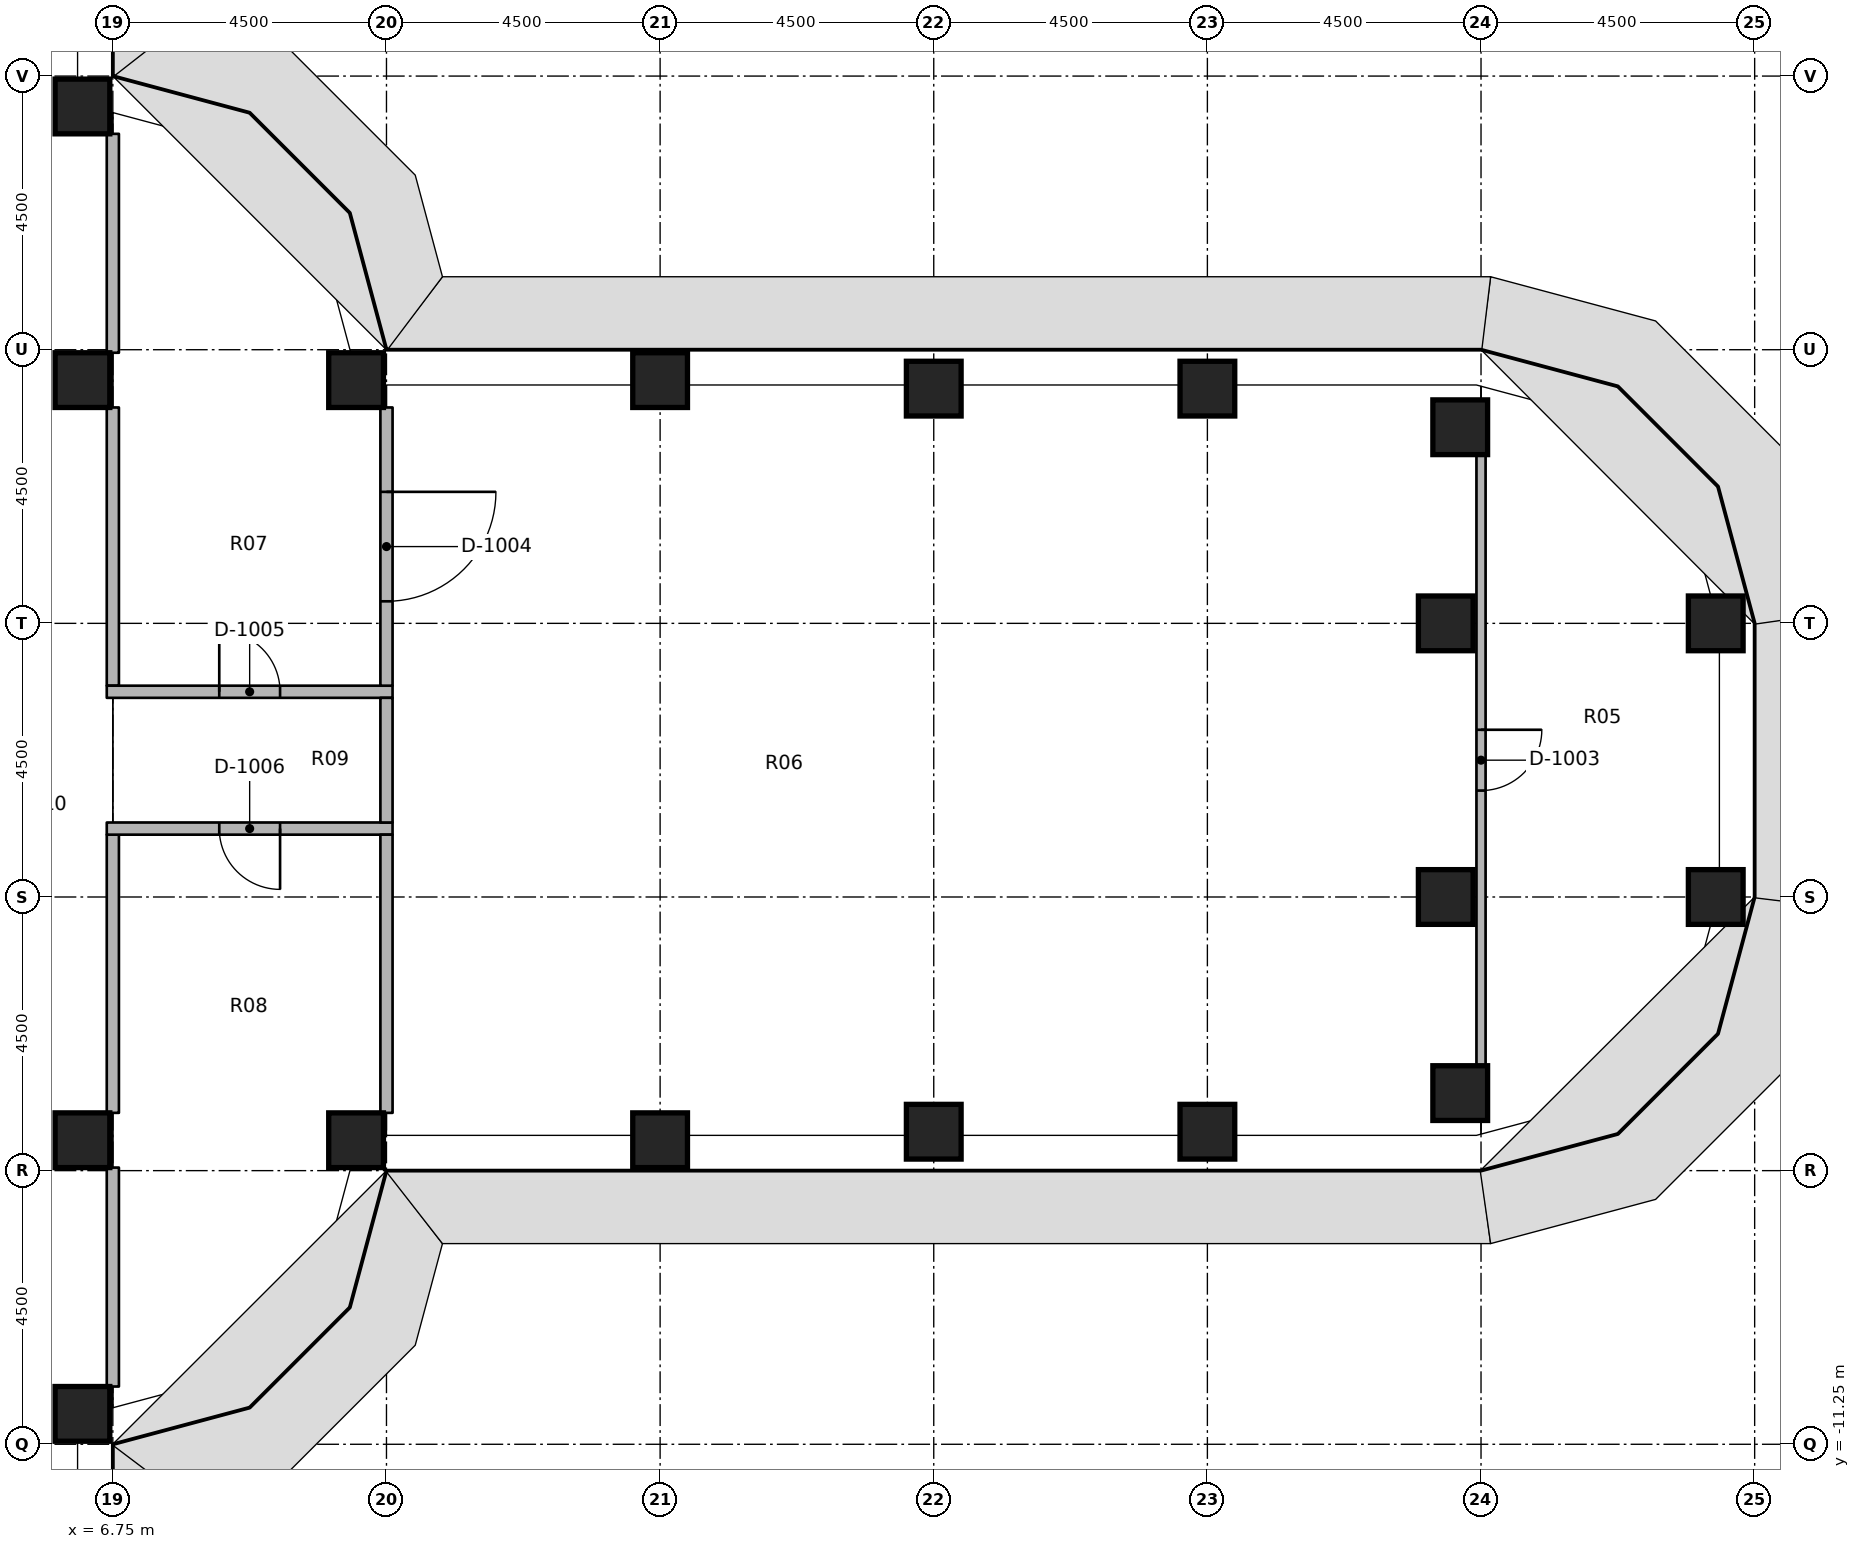
"""IFC4 building model, lengths in metres.
Left out: names, types, materials, properties, quantities, classifications, styles, units other than length and angle.
Written with IfcOpenShell. Run it as: python <this file> out.ifc"""

import sys

from ifc_helpers import new_model, si_unit, direction, frame, frame_2d, origin, origin_2d, place, context, subcontext, project, spatial, rectangle, extrude, element, fill, save


model = new_model("IFC4")
c1 = context("Model", 3, precision=1e-05, world=origin(), true_north=direction((0.0, 1.0)))
c2 = subcontext(c1, "Body", "Model", "MODEL_VIEW")
j1 = project(units=[si_unit("LENGTHUNIT", "METRE"), si_unit("PLANEANGLEUNIT", "RADIAN")], contexts=[c1])
p1 = place(None, origin())
s1 = spatial("IfcSite", under=j1, at=p1, CompositionType="ELEMENT")
p2 = place(p1, origin())
s2 = spatial("IfcBuilding", under=s1, at=p2, CompositionType="ELEMENT")
p3 = place(p2, frame((0.0, 0.0, 117.0)))
s3 = spatial("IfcBuildingStorey", under=s2, at=p3, CompositionType="ELEMENT", Elevation=117.0)
for number, where, z_axis, x_axis in (
    (1, (6.25, -10.75, 0.0), (0.0, 0.0, 1.0), (1.0, 0.0, 0.0)),
    (2, (6.25, -6.25, 0.0), (0.0, 0.0, 1.0), (1.0, 0.0, 0.0)),
    (3, (6.25, 6.25, 0.0), (0.0, 0.0, 1.0), (1.0, 0.0, 0.0)),
    (4, (6.25, 10.75, 0.0), (0.0, 0.0, 1.0), (1.0, 0.0, 0.0)),
    (5, (10.75, -6.25, 0.0), (0.0, 0.0, 1.0), (1.0, 0.0, 0.0)),
    (6, (10.75, 6.25, 0.0), (0.0, 0.0, 1.0), (1.0, 0.0, 0.0)),
    (7, (15.75, -6.25, 0.0), (0.0, 0.0, 1.0), (1.0, 0.0, 0.0)),
    (8, (15.75, 6.25, 0.0), (0.0, 0.0, 1.0), (1.0, 0.0, 0.0)),
    (9, (20.25, -6.11, 0.0), (0.0, 0.0, 1.0), (1.0, 0.0, 0.0)),
    (10, (20.25, 6.11, 0.0), (0.0, 0.0, 1.0), (1.0, 0.0, 0.0)),
    (11, (24.75, -6.11, 0.0), (0.0, 0.0, 1.0), (1.0, 0.0, 0.0)),
    (12, (24.75, 6.11, 0.0), (0.0, 0.0, 1.0), (1.0, 0.0, 0.0)),
    (13, (28.908, -5.475, 0.0), (0.0, 0.0, 1.0), (1.0, 0.0, 0.0)),
    (14, (28.67, -2.25, 0.0), (0.0, 0.0, 1.0), (1.0, 0.0, 0.0)),
    (15, (28.67, 2.25, 0.0), (0.0, 0.0, 1.0), (1.0, 0.0, 0.0)),
    (16, (28.908, 5.475, 0.0), (0.0, 0.0, 1.0), (1.0, 0.0, 0.0)),
    (17, (33.11, -2.25, 0.0), (0.0, 0.0, 1.0), (1.0, 0.0, 0.0)),
    (18, (33.11, 2.25, 0.0), (0.0, 0.0, 1.0), (1.0, 0.0, 0.0)),
):
    element("IfcColumn", number, at=place(p3, frame(where, z_axis=z_axis, x_axis=x_axis)), inside=s3, PredefinedType="COLUMN", context=c2, shape_type="SweptSolid", body=[
        extrude(rectangle(XDim=0.9, YDim=0.9, at=origin_2d()), origin(), (0.0, 0.0, 1.0), 3.65),
    ])
p4 = place(p3, frame((6.75, 1.225, 0.0), z_axis=(0.0, 0.0, 1.0), x_axis=(0.0, 1.0, 0.0)))
e19 = element("IfcWall", 19, at=p4, inside=s3, PredefinedType="PARTITIONING", context=c2, shape_type="SweptSolid", body=[
    extrude(rectangle(XDim=4.575, YDim=0.2, at=frame_2d((2.288, 0.0))), origin(), (0.0, 0.0, 1.0), 2.738),
])
for number, where, z_axis, x_axis in (
    (20, (6.75, 6.7, 0.0), (0.0, 0.0, 1.0), (0.0, 1.0, 0.0)),
    (21, (6.75, -10.3, 0.0), (0.0, 0.0, 1.0), (0.0, 1.0, 0.0)),
):
    element("IfcWall", number, at=place(p3, frame(where, z_axis=z_axis, x_axis=x_axis)), inside=s3, PredefinedType="PARTITIONING", context=c2, shape_type="SweptSolid", body=[
        extrude(rectangle(XDim=3.6, YDim=0.2, at=frame_2d((1.8, 0.0))), origin(), (0.0, 0.0, 1.0), 2.738),
    ])
p5 = place(p3, frame((6.75, -5.8, 0.0), z_axis=(0.0, 0.0, 1.0), x_axis=(0.0, 1.0, 0.0)))
e22 = element("IfcWall", 22, at=p5, inside=s3, PredefinedType="PARTITIONING", context=c2, shape_type="SweptSolid", body=[
    extrude(rectangle(XDim=4.575, YDim=0.2, at=frame_2d((2.288, 0.0))), origin(), (0.0, 0.0, 1.0), 2.738),
])
p6 = place(p3, frame((6.65, 1.125, 0.0), z_axis=(0.0, 0.0, 1.0), x_axis=(1.0, 0.0, 0.0)))
e23 = element("IfcWall", 23, at=p6, inside=s3, PredefinedType="PARTITIONING", context=c2, shape_type="SweptSolid", body=[
    extrude(rectangle(XDim=4.7, YDim=0.2, at=frame_2d((2.35, 0.0))), origin(), (0.0, 0.0, 1.0), 2.738),
])
p7 = place(p6, frame((1.85, 0.0, 0.0)))
e24 = element("IfcOpeningElement", 24, at=p7, cuts=e23, PredefinedType="OPENING", context=c2, shape_type="SweptSolid", body=[
    extrude(rectangle(XDim=1.0, YDim=2.1, at=frame_2d((0.5, 1.05))), frame((0.0, 0.11, 0.0), z_axis=(0.0, -1.0, 0.0), x_axis=(1.0, 0.0, 0.0)), (0.0, 0.0, 1.0), 0.22),
])
p8 = place(p3, frame((11.35, -1.125, 0.0), z_axis=(0.0, 0.0, 1.0), x_axis=(-1.0, 0.0, 0.0)))
e25 = element("IfcWall", 25, at=p8, inside=s3, PredefinedType="PARTITIONING", context=c2, shape_type="SweptSolid", body=[
    extrude(rectangle(XDim=4.7, YDim=0.2, at=frame_2d((2.35, 0.0))), origin(), (0.0, 0.0, 1.0), 2.738),
])
p9 = place(p8, frame((1.85, 0.0, 0.0)))
e26 = element("IfcOpeningElement", 26, at=p9, cuts=e25, PredefinedType="OPENING", context=c2, shape_type="SweptSolid", body=[
    extrude(rectangle(XDim=1.0, YDim=2.1, at=frame_2d((0.5, 1.05))), frame((0.0, 0.11, 0.0), z_axis=(0.0, -1.0, 0.0), x_axis=(1.0, 0.0, 0.0)), (0.0, 0.0, 1.0), 0.22),
])
p10 = place(p3, frame((11.25, -1.025, 0.0), z_axis=(0.0, 0.0, 1.0), x_axis=(0.0, 1.0, 0.0)))
e27 = element("IfcWall", 27, at=p10, inside=s3, PredefinedType="PARTITIONING", context=c2, shape_type="SweptSolid", body=[
    extrude(rectangle(XDim=2.05, YDim=0.2, at=frame_2d((1.025, 0.0))), origin(), (0.0, 0.0, 1.0), 2.738),
])
p11 = place(p3, frame((11.25, 5.8, 0.0), z_axis=(0.0, 0.0, 1.0), x_axis=(0.0, -1.0, 0.0)))
e28 = element("IfcWall", 28, at=p11, inside=s3, PredefinedType="PARTITIONING", context=c2, shape_type="SweptSolid", body=[
    extrude(rectangle(XDim=4.575, YDim=0.2, at=frame_2d((2.288, 0.0))), origin(), (0.0, 0.0, 1.0), 2.738),
])
p12 = place(p11, frame((1.387, 0.0, 0.0)))
e29 = element("IfcOpeningElement", 29, at=p12, cuts=e28, PredefinedType="OPENING", context=c2, shape_type="SweptSolid", body=[
    extrude(rectangle(XDim=1.8, YDim=2.1, at=frame_2d((0.9, 1.05))), frame((0.0, 0.11, 0.0), z_axis=(0.0, -1.0, 0.0), x_axis=(1.0, 0.0, 0.0)), (0.0, 0.0, 1.0), 0.22),
])
p13 = place(p3, frame((11.25, -5.8, 0.0), z_axis=(0.0, 0.0, 1.0), x_axis=(0.0, 1.0, 0.0)))
e30 = element("IfcWall", 30, at=p13, inside=s3, PredefinedType="PARTITIONING", context=c2, shape_type="SweptSolid", body=[
    extrude(rectangle(XDim=4.575, YDim=0.2, at=frame_2d((2.288, 0.0))), origin(), (0.0, 0.0, 1.0), 2.738),
])
p14 = place(p3, frame((29.25, 5.025, 0.0), z_axis=(0.0, 0.0, 1.0), x_axis=(0.0, -1.0, 0.0)))
e31 = element("IfcWall", 31, at=p14, inside=s3, PredefinedType="PARTITIONING", context=c2, shape_type="SweptSolid", body=[
    extrude(rectangle(XDim=10.05, YDim=0.15, at=frame_2d((5.025, 0.0))), origin(), (0.0, 0.0, 1.0), 2.738),
])
p15 = place(p14, frame((4.525, 0.0, 0.0)))
e32 = element("IfcOpeningElement", 32, at=p15, cuts=e31, PredefinedType="OPENING", context=c2, shape_type="SweptSolid", body=[
    extrude(rectangle(XDim=1.0, YDim=2.1, at=frame_2d((0.5, 1.05))), frame((0.0, 0.085, 0.0), z_axis=(0.0, -1.0, 0.0), x_axis=(1.0, 0.0, 0.0)), (0.0, 0.0, 1.0), 0.17),
])
p16 = place(p15, origin())
e33 = element("IfcDoor", 33, at=p16, inside=s3, OperationType="SINGLE_SWING_RIGHT", PredefinedType="DOOR", context=c2, shape_type="SweptSolid", body=[
    extrude(rectangle(XDim=1.0, YDim=2.1, at=frame_2d((0.5, 1.05))), frame((0.0, 0.025, 0.0), z_axis=(0.0, -1.0, 0.0), x_axis=(1.0, 0.0, 0.0)), (0.0, 0.0, 1.0), 0.05),
])
fill(e32, e33)
p17 = place(p12, origin())
e34 = element("IfcDoor", 34, at=p17, inside=s3, OperationType="DOUBLE_DOOR_SINGLE_SWING", PredefinedType="DOOR", context=c2, shape_type="SweptSolid", body=[
    extrude(rectangle(XDim=1.8, YDim=2.1, at=frame_2d((0.9, 1.05))), frame((0.0, 0.025, 0.0), z_axis=(0.0, -1.0, 0.0), x_axis=(1.0, 0.0, 0.0)), (0.0, 0.0, 1.0), 0.05),
])
fill(e29, e34)
p18 = place(p7, origin())
e35 = element("IfcDoor", 35, at=p18, inside=s3, OperationType="SINGLE_SWING_RIGHT", PredefinedType="DOOR", context=c2, shape_type="SweptSolid", body=[
    extrude(rectangle(XDim=1.0, YDim=2.1, at=frame_2d((0.5, 1.05))), frame((0.0, 0.025, 0.0), z_axis=(0.0, -1.0, 0.0), x_axis=(1.0, 0.0, 0.0)), (0.0, 0.0, 1.0), 0.05),
])
fill(e24, e35)
p19 = place(p9, origin())
e36 = element("IfcDoor", 36, at=p19, inside=s3, OperationType="SINGLE_SWING_RIGHT", PredefinedType="DOOR", context=c2, shape_type="SweptSolid", body=[
    extrude(rectangle(XDim=1.0, YDim=2.1, at=frame_2d((0.5, 1.05))), frame((0.0, 0.025, 0.0), z_axis=(0.0, -1.0, 0.0), x_axis=(1.0, 0.0, 0.0)), (0.0, 0.0, 1.0), 0.05),
])
fill(e26, e36)
save(model, sys.argv[1])
